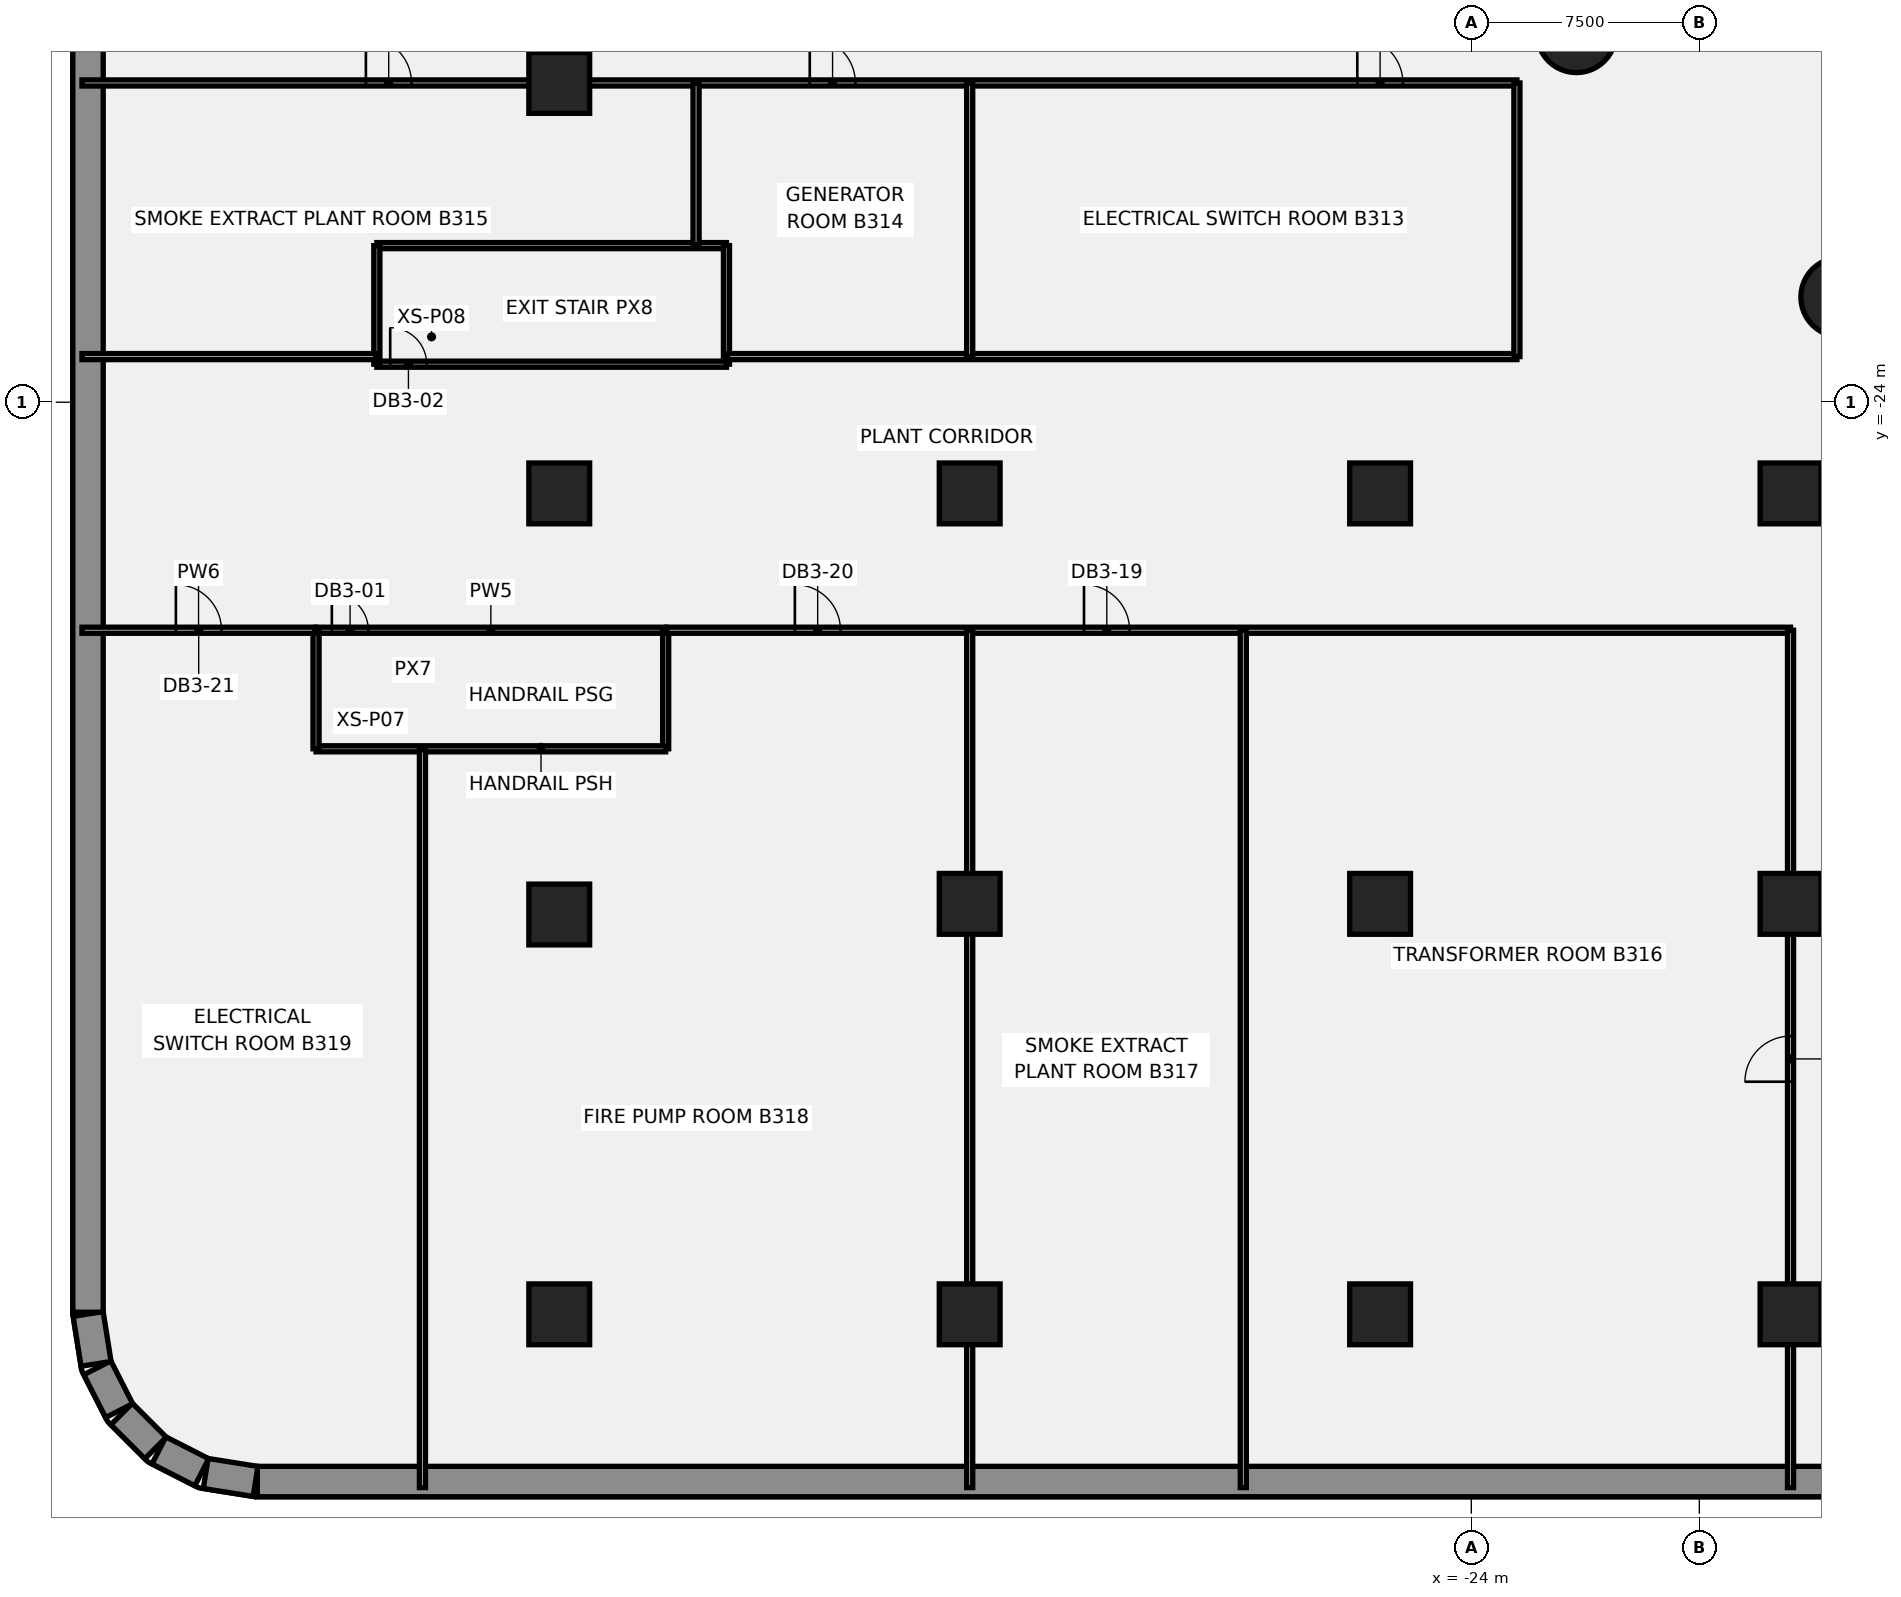
"""IFC4 building model, lengths in metres.
Left out: names, types, materials, properties, quantities, classifications, styles, units other than length and angle.
Written with IfcOpenShell. Run it as: python <this file> out.ifc"""

import sys

from ifc_helpers import new_model, si_unit, direction, frame, frame_2d, origin, origin_2d, place, context, subcontext, project, spatial, rectangle, circle, extrude, element, fill, save


model = new_model("IFC4")
c1 = context("Model", 3, precision=1e-05, world=origin(), true_north=direction((0.0, 1.0)))
c2 = subcontext(c1, "Body", "Model", "MODEL_VIEW")
j1 = project(units=[si_unit("LENGTHUNIT", "METRE"), si_unit("PLANEANGLEUNIT", "RADIAN")], contexts=[c1])
p1 = place(None, origin())
s1 = spatial("IfcSite", under=j1, at=p1, CompositionType="ELEMENT")
p2 = place(p1, origin())
s2 = spatial("IfcBuilding", under=s1, at=p2, CompositionType="ELEMENT")
p3 = place(p2, frame((0.0, 0.0, -21.0)))
s3 = spatial("IfcBuildingStorey", under=s2, at=p3, CompositionType="ELEMENT", Elevation=-21.0)
p4 = place(p3, frame((63.931, -59.5, -0.3), z_axis=(0.0, 0.0, 1.0), x_axis=(-1.0, 0.0, 0.0)))
e1 = element("IfcWall", 1, at=p4, inside=s3, PredefinedType="SOLIDWALL", context=c2, shape_type="SweptSolid", body=[
    extrude(rectangle(XDim=127.863, YDim=1.0, at=frame_2d((63.931, 0.0))), origin(), (0.0, 0.0, 1.0), 6.85),
])
p5 = place(p3, frame((-63.99, -59.495, -0.3), z_axis=(0.0, 0.0, 1.0), x_axis=(-0.987688946427, 0.156430639922, 0.0)))
e2 = element("IfcWall", 2, at=p5, inside=s3, PredefinedType="SOLIDWALL", context=c2, shape_type="SweptSolid", body=[
    extrude(rectangle(XDim=1.661, YDim=1.0, at=frame_2d((0.83, 0.0))), origin(), (0.0, 0.0, 1.0), 6.85),
])
for number, where, z_axis, x_axis in (
    (3, (-65.759, -59.194, -0.3), (0.0, 0.0, 1.0), (-0.891, 0.454, 0.0)),
    (4, (-67.278, -58.396, -0.3), (0.0, 0.0, 1.0), (-0.707, 0.707, 0.0)),
    (5, (-68.476, -57.168, -0.3), (0.0, 0.0, 1.0), (-0.454, 0.891, 0.0)),
):
    element("IfcWall", number, at=place(p3, frame(where, z_axis=z_axis, x_axis=x_axis)), inside=s3, PredefinedType="SOLIDWALL", context=c2, shape_type="SweptSolid", body=[
        extrude(rectangle(XDim=1.581, YDim=1.0, at=frame_2d((0.791, 0.0))), origin(), (0.0, 0.0, 1.0), 6.85),
    ])
p6 = place(p3, frame((-69.236, -55.63, -0.3), z_axis=(0.0, 0.0, 1.0), x_axis=(-0.156430639922, 0.987688946427, 0.0)))
e6 = element("IfcWall", 6, at=p6, inside=s3, PredefinedType="SOLIDWALL", context=c2, shape_type="SweptSolid", body=[
    extrude(rectangle(XDim=1.661, YDim=1.0, at=frame_2d((0.83, 0.0))), origin(), (0.0, 0.0, 1.0), 6.85),
])
p7 = place(p3, frame((-69.5, -53.931, -0.3), z_axis=(0.0, 0.0, 1.0), x_axis=(0.0, 1.0, 0.0)))
e7 = element("IfcWall", 7, at=p7, inside=s3, PredefinedType="SOLIDWALL", context=c2, shape_type="SweptSolid", body=[
    extrude(rectangle(XDim=107.863, YDim=1.0, at=frame_2d((53.931, 0.0))), origin(), (0.0, 0.0, 1.0), 6.85),
])
for number, where, z_axis, x_axis in (
    (8, (-20.543, -11.86, -0.3), (0.0, 0.0, 1.0), (1.0, 0.0, 0.0)),
    (9, (-11.86, -20.543, -0.3), (0.0, 0.0, 1.0), (1.0, 0.0, 0.0)),
):
    element("IfcColumn", number, at=place(p3, frame(where, z_axis=z_axis, x_axis=x_axis)), inside=s3, PredefinedType="COLUMN", context=c2, shape_type="SweptSolid", body=[
        extrude(circle(Radius=1.3, at=origin_2d()), origin(), (0.0, 0.0, 1.0), 6.85),
    ])
for number, where, z_axis, x_axis in (
    (10, (-54.0, -54.0, -0.3), (0.0, 0.0, 1.0), (1.0, 0.0, 0.0)),
    (11, (-54.0, -40.85, -0.3), (0.0, 0.0, 1.0), (1.0, 0.0, 0.0)),
    (12, (-54.0, -27.0, -0.3), (0.0, 0.0, 1.0), (1.0, 0.0, 0.0)),
    (13, (-54.0, -13.5, -0.3), (0.0, 0.0, 1.0), (1.0, 0.0, 0.0)),
    (14, (-40.5, -54.0, -0.3), (0.0, 0.0, 1.0), (1.0, 0.0, 0.0)),
    (15, (-40.5, -40.5, -0.3), (0.0, 0.0, 1.0), (1.0, 0.0, 0.0)),
    (16, (-40.5, -27.0, -0.3), (0.0, 0.0, 1.0), (1.0, 0.0, 0.0)),
    (17, (-27.0, -54.0, -0.3), (0.0, 0.0, 1.0), (1.0, 0.0, 0.0)),
    (18, (-27.0, -40.5, -0.3), (0.0, 0.0, 1.0), (1.0, 0.0, 0.0)),
    (19, (-27.0, -27.0, -0.3), (0.0, 0.0, 1.0), (1.0, 0.0, 0.0)),
    (20, (-13.5, -54.0, -0.3), (0.0, 0.0, 1.0), (1.0, 0.0, 0.0)),
    (21, (-13.5, -40.5, -0.3), (0.0, 0.0, 1.0), (1.0, 0.0, 0.0)),
    (22, (-13.5, -27.0, -0.3), (0.0, 0.0, 1.0), (1.0, 0.0, 0.0)),
):
    element("IfcColumn", number, at=place(p3, frame(where, z_axis=z_axis, x_axis=x_axis)), inside=s3, PredefinedType="COLUMN", context=c2, shape_type="SweptSolid", body=[
        extrude(rectangle(XDim=2.0, YDim=2.0, at=origin_2d()), origin(), (0.0, 0.0, 1.0), 6.85),
    ])
p8 = place(p3, frame((-62.0, -31.5, 0.0), z_axis=(0.0, 0.0, 1.0), x_axis=(1.0, 0.0, 0.0)))
e23 = element("IfcWall", 23, at=p8, inside=s3, PredefinedType="PARTITIONING", context=c2, shape_type="SweptSolid", body=[
    extrude(rectangle(XDim=11.5, YDim=0.2, at=frame_2d((5.75, 0.0))), origin(), (0.0, 0.0, 1.0), 6.55),
])
p9 = place(p8, frame((0.52, 0.0, 0.0)))
e24 = element("IfcOpeningElement", 24, at=p9, cuts=e23, PredefinedType="OPENING", context=c2, shape_type="SweptSolid", body=[
    extrude(rectangle(XDim=1.2, YDim=2.1, at=frame_2d((0.6, 1.05))), frame((0.0, 0.11, 0.0), z_axis=(0.0, -1.0, 0.0), x_axis=(1.0, 0.0, 0.0)), (0.0, 0.0, 1.0), 0.22),
])
p10 = place(p3, frame((-50.5, -35.4, 0.0), z_axis=(0.0, 0.0, 1.0), x_axis=(0.0, 1.0, 0.0)))
e25 = element("IfcWall", 25, at=p10, inside=s3, PredefinedType="PARTITIONING", context=c2, shape_type="SweptSolid", body=[
    extrude(rectangle(XDim=3.9, YDim=0.2, at=frame_2d((1.95, 0.0))), origin(), (0.0, 0.0, 1.0), 6.55),
])
p11 = place(p3, frame((-62.0, -35.4, 0.0), z_axis=(0.0, 0.0, 1.0), x_axis=(1.0, 0.0, 0.0)))
e26 = element("IfcWall", 26, at=p11, inside=s3, PredefinedType="PARTITIONING", context=c2, shape_type="SweptSolid", body=[
    extrude(rectangle(XDim=11.5, YDim=0.2, at=frame_2d((5.75, 0.0))), origin(), (0.0, 0.0, 1.0), 6.55),
])
p12 = place(p3, frame((-62.0, -35.4, 0.0), z_axis=(0.0, 0.0, 1.0), x_axis=(0.0, 1.0, 0.0)))
e27 = element("IfcWall", 27, at=p12, inside=s3, PredefinedType="PARTITIONING", context=c2, shape_type="SweptSolid", body=[
    extrude(rectangle(XDim=3.9, YDim=0.2, at=frame_2d((1.95, 0.0))), origin(), (0.0, 0.0, 1.0), 6.55),
])
p13 = place(p3, frame((-60.0, -18.85, 0.0), z_axis=(0.0, 0.0, 1.0), x_axis=(1.0, 0.0, 0.0)))
e28 = element("IfcWall", 28, at=p13, inside=s3, PredefinedType="PARTITIONING", context=c2, shape_type="SweptSolid", body=[
    extrude(rectangle(XDim=11.5, YDim=0.2, at=frame_2d((5.75, 0.0))), origin(), (0.0, 0.0, 1.0), 6.55),
])
p14 = place(p3, frame((-48.5, -22.75, 0.0), z_axis=(0.0, 0.0, 1.0), x_axis=(0.0, 1.0, 0.0)))
e29 = element("IfcWall", 29, at=p14, inside=s3, PredefinedType="PARTITIONING", context=c2, shape_type="SweptSolid", body=[
    extrude(rectangle(XDim=3.9, YDim=0.2, at=frame_2d((1.95, 0.0))), origin(), (0.0, 0.0, 1.0), 6.55),
])
p15 = place(p3, frame((-60.0, -22.75, 0.0), z_axis=(0.0, 0.0, 1.0), x_axis=(1.0, 0.0, 0.0)))
e30 = element("IfcWall", 30, at=p15, inside=s3, PredefinedType="PARTITIONING", context=c2, shape_type="SweptSolid", body=[
    extrude(rectangle(XDim=11.5, YDim=0.2, at=frame_2d((5.75, 0.0))), origin(), (0.0, 0.0, 1.0), 6.55),
])
p16 = place(p15, frame((0.439, 0.0, 0.0)))
e31 = element("IfcOpeningElement", 31, at=p16, cuts=e30, PredefinedType="OPENING", context=c2, shape_type="SweptSolid", body=[
    extrude(rectangle(XDim=1.2, YDim=2.1, at=frame_2d((0.6, 1.05))), frame((0.0, 0.11, 0.0), z_axis=(0.0, -1.0, 0.0), x_axis=(1.0, 0.0, 0.0)), (0.0, 0.0, 1.0), 0.22),
])
p17 = place(p3, frame((-60.0, -22.75, 0.0), z_axis=(0.0, 0.0, 1.0), x_axis=(0.0, 1.0, 0.0)))
e32 = element("IfcWall", 32, at=p17, inside=s3, PredefinedType="PARTITIONING", context=c2, shape_type="SweptSolid", body=[
    extrude(rectangle(XDim=3.9, YDim=0.2, at=frame_2d((1.95, 0.0))), origin(), (0.0, 0.0, 1.0), 6.55),
])
p18 = place(p3, frame((-69.699, -31.5, 0.0), z_axis=(0.0, 0.0, 1.0), x_axis=(1.0, 0.0, 0.0)))
e33 = element("IfcWall", 33, at=p18, inside=s3, PredefinedType="PARTITIONING", context=c2, shape_type="SweptSolid", body=[
    extrude(rectangle(XDim=7.669, YDim=0.2, at=frame_2d((3.834, 0.0))), origin(), (0.0, 0.0, 1.0), 6.55),
])
p19 = place(p18, frame((3.089, 0.0, 0.0)))
e34 = element("IfcOpeningElement", 34, at=p19, cuts=e33, PredefinedType="OPENING", context=c2, shape_type="SweptSolid", body=[
    extrude(rectangle(XDim=1.5, YDim=2.1, at=frame_2d((0.75, 1.05))), frame((0.0, 0.11, 0.0), z_axis=(0.0, -1.0, 0.0), x_axis=(1.0, 0.0, 0.0)), (0.0, 0.0, 1.0), 0.22),
])
p20 = place(p3, frame((-69.699, -22.5, 0.0), z_axis=(0.0, 0.0, 1.0), x_axis=(1.0, 0.0, 0.0)))
e35 = element("IfcWall", 35, at=p20, inside=s3, PredefinedType="PARTITIONING", context=c2, shape_type="SweptSolid", body=[
    extrude(rectangle(XDim=9.669, YDim=0.2, at=frame_2d((4.834, 0.0))), origin(), (0.0, 0.0, 1.0), 6.55),
])
p21 = place(p3, frame((-69.699, -13.5, 0.0), z_axis=(0.0, 0.0, 1.0), x_axis=(1.0, 0.0, 0.0)))
e36 = element("IfcWall", 36, at=p21, inside=s3, PredefinedType="PARTITIONING", context=c2, shape_type="SweptSolid", body=[
    extrude(rectangle(XDim=47.199, YDim=0.2, at=frame_2d((23.6, 0.0))), origin(), (0.0, 0.0, 1.0), 6.55),
])
p22 = place(p21, frame((41.949, 0.0, 0.0)))
e37 = element("IfcOpeningElement", 37, at=p22, cuts=e36, PredefinedType="OPENING", context=c2, shape_type="SweptSolid", body=[
    extrude(rectangle(XDim=1.5, YDim=2.1, at=frame_2d((0.75, 1.05))), frame((0.0, 0.11, 0.0), z_axis=(0.0, -1.0, 0.0), x_axis=(1.0, 0.0, 0.0)), (0.0, 0.0, 1.0), 0.22),
])
p23 = place(p21, frame((23.939, 0.0, 0.0)))
e38 = element("IfcOpeningElement", 38, at=p23, cuts=e36, PredefinedType="OPENING", context=c2, shape_type="SweptSolid", body=[
    extrude(rectangle(XDim=1.5, YDim=2.1, at=frame_2d((0.75, 1.05))), frame((0.0, 0.11, 0.0), z_axis=(0.0, -1.0, 0.0), x_axis=(1.0, 0.0, 0.0)), (0.0, 0.0, 1.0), 0.22),
])
p24 = place(p21, frame((9.339, 0.0, 0.0)))
e39 = element("IfcOpeningElement", 39, at=p24, cuts=e36, PredefinedType="OPENING", context=c2, shape_type="SweptSolid", body=[
    extrude(rectangle(XDim=1.5, YDim=2.1, at=frame_2d((0.75, 1.05))), frame((0.0, 0.11, 0.0), z_axis=(0.0, -1.0, 0.0), x_axis=(1.0, 0.0, 0.0)), (0.0, 0.0, 1.0), 0.22),
])
p25 = place(p3, frame((-58.5, -59.699, 0.0), z_axis=(0.0, 0.0, 1.0), x_axis=(0.0, 1.0, 0.0)))
e40 = element("IfcWall", 40, at=p25, inside=s3, PredefinedType="PARTITIONING", context=c2, shape_type="SweptSolid", body=[
    extrude(rectangle(XDim=24.269, YDim=0.2, at=frame_2d((12.135, 0.0))), origin(), (0.0, 0.0, 1.0), 6.55),
])
p26 = place(p3, frame((-50.47, -31.5, 0.0), z_axis=(0.0, 0.0, 1.0), x_axis=(1.0, 0.0, 0.0)))
e41 = element("IfcWall", 41, at=p26, inside=s3, PredefinedType="PARTITIONING", context=c2, shape_type="SweptSolid", body=[
    extrude(rectangle(XDim=36.97, YDim=0.2, at=frame_2d((18.485, 0.0))), origin(), (0.0, 0.0, 1.0), 6.55),
])
p27 = place(p26, frame((13.73, 0.0, 0.0)))
e42 = element("IfcOpeningElement", 42, at=p27, cuts=e41, PredefinedType="OPENING", context=c2, shape_type="SweptSolid", body=[
    extrude(rectangle(XDim=1.5, YDim=2.1, at=frame_2d((0.75, 1.05))), frame((0.0, 0.11, 0.0), z_axis=(0.0, -1.0, 0.0), x_axis=(1.0, 0.0, 0.0)), (0.0, 0.0, 1.0), 0.22),
])
p28 = place(p26, frame((4.22, 0.0, 0.0)))
e43 = element("IfcOpeningElement", 43, at=p28, cuts=e41, PredefinedType="OPENING", context=c2, shape_type="SweptSolid", body=[
    extrude(rectangle(XDim=1.5, YDim=2.1, at=frame_2d((0.75, 1.05))), frame((0.0, 0.11, 0.0), z_axis=(0.0, -1.0, 0.0), x_axis=(1.0, 0.0, 0.0)), (0.0, 0.0, 1.0), 0.22),
])
p29 = place(p3, frame((-49.5, -18.82, 0.0), z_axis=(0.0, 0.0, 1.0), x_axis=(0.0, 1.0, 0.0)))
e44 = element("IfcWall", 44, at=p29, inside=s3, PredefinedType="PARTITIONING", context=c2, shape_type="SweptSolid", body=[
    extrude(rectangle(XDim=5.32, YDim=0.2, at=frame_2d((2.66, 0.0))), origin(), (0.0, 0.0, 1.0), 6.55),
])
p30 = place(p3, frame((-48.47, -22.5, 0.0), z_axis=(0.0, 0.0, 1.0), x_axis=(1.0, 0.0, 0.0)))
e45 = element("IfcWall", 45, at=p30, inside=s3, PredefinedType="PARTITIONING", context=c2, shape_type="SweptSolid", body=[
    extrude(rectangle(XDim=25.97, YDim=0.2, at=frame_2d((12.985, 0.0))), origin(), (0.0, 0.0, 1.0), 6.55),
])
p31 = place(p3, frame((-40.5, -59.699, 0.0), z_axis=(0.0, 0.0, 1.0), x_axis=(0.0, 1.0, 0.0)))
e46 = element("IfcWall", 46, at=p31, inside=s3, PredefinedType="PARTITIONING", context=c2, shape_type="SweptSolid", body=[
    extrude(rectangle(XDim=28.199, YDim=0.2, at=frame_2d((14.1, 0.0))), origin(), (0.0, 0.0, 1.0), 6.55),
])
for number, where, z_axis, x_axis in (
    (47, (-22.5, -22.5, 0.0), (0.0, 0.0, 1.0), (0.0, 1.0, 0.0)),
    (48, (-40.5, -22.5, 0.0), (0.0, 0.0, 1.0), (0.0, 1.0, 0.0)),
):
    element("IfcWall", number, at=place(p3, frame(where, z_axis=z_axis, x_axis=x_axis)), inside=s3, PredefinedType="PARTITIONING", context=c2, shape_type="SweptSolid", body=[
        extrude(rectangle(XDim=9.0, YDim=0.2, at=frame_2d((4.5, 0.0))), origin(), (0.0, 0.0, 1.0), 6.55),
    ])
p32 = place(p3, frame((-31.5, -59.699, 0.0), z_axis=(0.0, 0.0, 1.0), x_axis=(0.0, 1.0, 0.0)))
e49 = element("IfcWall", 49, at=p32, inside=s3, PredefinedType="PARTITIONING", context=c2, shape_type="SweptSolid", body=[
    extrude(rectangle(XDim=28.199, YDim=0.2, at=frame_2d((14.1, 0.0))), origin(), (0.0, 0.0, 1.0), 6.55),
])
p33 = place(p3, frame((-13.5, -59.699, 0.0), z_axis=(0.0, 0.0, 1.0), x_axis=(0.0, 1.0, 0.0)))
e50 = element("IfcWall", 50, at=p33, inside=s3, PredefinedType="PARTITIONING", context=c2, shape_type="SweptSolid", body=[
    extrude(rectangle(XDim=28.199, YDim=0.2, at=frame_2d((14.1, 0.0))), origin(), (0.0, 0.0, 1.0), 6.55),
])
p34 = place(p33, frame((13.349, 0.0, 0.0)))
e51 = element("IfcOpeningElement", 51, at=p34, cuts=e50, PredefinedType="OPENING", context=c2, shape_type="SweptSolid", body=[
    extrude(rectangle(XDim=1.5, YDim=2.1, at=frame_2d((0.75, 1.05))), frame((0.0, 0.11, 0.0), z_axis=(0.0, -1.0, 0.0), x_axis=(1.0, 0.0, 0.0)), (0.0, 0.0, 1.0), 0.22),
])
p35 = place(p9, origin())
e52 = element("IfcDoor", 52, at=p35, inside=s3, OperationType="SINGLE_SWING_LEFT", PredefinedType="DOOR", context=c2, shape_type="SweptSolid", body=[
    extrude(rectangle(XDim=1.2, YDim=2.1, at=frame_2d((0.6, 1.05))), frame((0.0, 0.025, 0.0), z_axis=(0.0, -1.0, 0.0), x_axis=(1.0, 0.0, 0.0)), (0.0, 0.0, 1.0), 0.05),
])
fill(e24, e52)
p36 = place(p16, origin())
e53 = element("IfcDoor", 53, at=p36, inside=s3, OperationType="SINGLE_SWING_RIGHT", PredefinedType="DOOR", context=c2, shape_type="SweptSolid", body=[
    extrude(rectangle(XDim=1.2, YDim=2.1, at=frame_2d((0.6, 1.05))), frame((0.0, 0.025, 0.0), z_axis=(0.0, -1.0, 0.0), x_axis=(1.0, 0.0, 0.0)), (0.0, 0.0, 1.0), 0.05),
])
fill(e31, e53)
p37 = place(p22, origin())
e54 = element("IfcDoor", 54, at=p37, inside=s3, OperationType="SINGLE_SWING_LEFT", PredefinedType="DOOR", context=c2, shape_type="SweptSolid", body=[
    extrude(rectangle(XDim=1.5, YDim=2.1, at=frame_2d((0.75, 1.05))), frame((0.0, 0.025, 0.0), z_axis=(0.0, -1.0, 0.0), x_axis=(1.0, 0.0, 0.0)), (0.0, 0.0, 1.0), 0.05),
])
fill(e37, e54)
p38 = place(p23, origin())
e55 = element("IfcDoor", 55, at=p38, inside=s3, OperationType="SINGLE_SWING_RIGHT", PredefinedType="DOOR", context=c2, shape_type="SweptSolid", body=[
    extrude(rectangle(XDim=1.5, YDim=2.1, at=frame_2d((0.75, 1.05))), frame((0.0, 0.025, 0.0), z_axis=(0.0, -1.0, 0.0), x_axis=(1.0, 0.0, 0.0)), (0.0, 0.0, 1.0), 0.05),
])
fill(e38, e55)
p39 = place(p24, origin())
e56 = element("IfcDoor", 56, at=p39, inside=s3, OperationType="SINGLE_SWING_LEFT", PredefinedType="DOOR", context=c2, shape_type="SweptSolid", body=[
    extrude(rectangle(XDim=1.5, YDim=2.1, at=frame_2d((0.75, 1.05))), frame((0.0, 0.025, 0.0), z_axis=(0.0, -1.0, 0.0), x_axis=(1.0, 0.0, 0.0)), (0.0, 0.0, 1.0), 0.05),
])
fill(e39, e56)
p40 = place(p34, origin())
e57 = element("IfcDoor", 57, at=p40, inside=s3, OperationType="SINGLE_SWING_RIGHT", PredefinedType="DOOR", context=c2, shape_type="SweptSolid", body=[
    extrude(rectangle(XDim=1.5, YDim=2.1, at=frame_2d((0.75, 1.05))), frame((0.0, 0.025, 0.0), z_axis=(0.0, -1.0, 0.0), x_axis=(1.0, 0.0, 0.0)), (0.0, 0.0, 1.0), 0.05),
])
fill(e51, e57)
p41 = place(p27, origin())
e58 = element("IfcDoor", 58, at=p41, inside=s3, OperationType="SINGLE_SWING_LEFT", PredefinedType="DOOR", context=c2, shape_type="SweptSolid", body=[
    extrude(rectangle(XDim=1.5, YDim=2.1, at=frame_2d((0.75, 1.05))), frame((0.0, 0.025, 0.0), z_axis=(0.0, -1.0, 0.0), x_axis=(1.0, 0.0, 0.0)), (0.0, 0.0, 1.0), 0.05),
])
fill(e42, e58)
p42 = place(p28, origin())
e59 = element("IfcDoor", 59, at=p42, inside=s3, OperationType="SINGLE_SWING_RIGHT", PredefinedType="DOOR", context=c2, shape_type="SweptSolid", body=[
    extrude(rectangle(XDim=1.5, YDim=2.1, at=frame_2d((0.75, 1.05))), frame((0.0, 0.025, 0.0), z_axis=(0.0, -1.0, 0.0), x_axis=(1.0, 0.0, 0.0)), (0.0, 0.0, 1.0), 0.05),
])
fill(e43, e59)
p43 = place(p19, origin())
e60 = element("IfcDoor", 60, at=p43, inside=s3, OperationType="SINGLE_SWING_LEFT", PredefinedType="DOOR", context=c2, shape_type="SweptSolid", body=[
    extrude(rectangle(XDim=1.5, YDim=2.1, at=frame_2d((0.75, 1.05))), frame((0.0, 0.025, 0.0), z_axis=(0.0, -1.0, 0.0), x_axis=(1.0, 0.0, 0.0)), (0.0, 0.0, 1.0), 0.05),
])
fill(e34, e60)
save(model, sys.argv[1])
